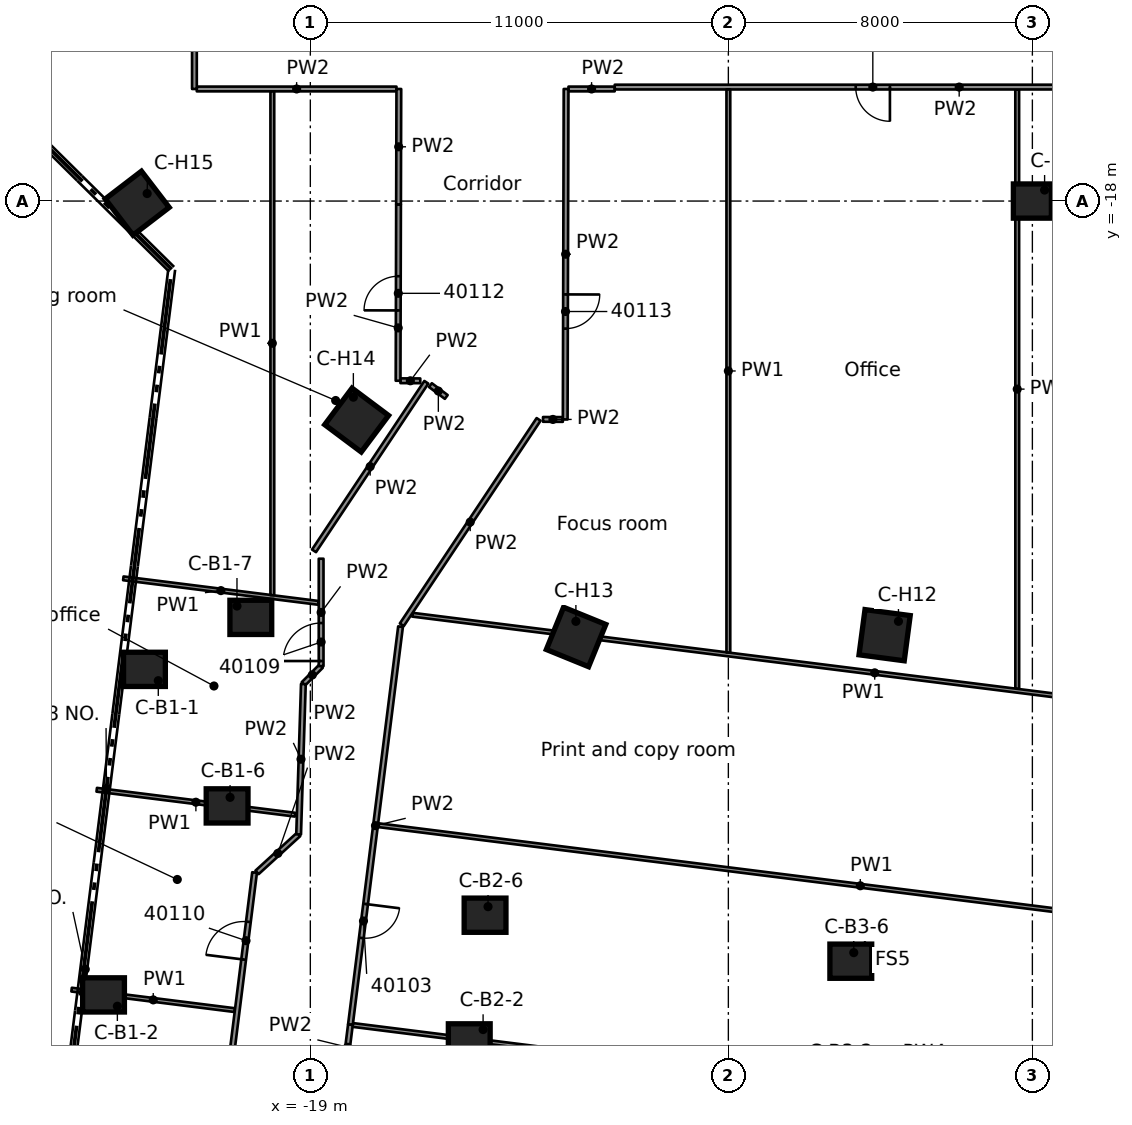
"""IFC4 building model, lengths in metres.
Left out: names, types, materials, properties, quantities, classifications, styles, units other than length and angle.
Written with IfcOpenShell. Run it as: python <this file> out.ifc"""

import sys

from ifc_helpers import new_model, si_unit, direction, frame, frame_2d, origin, origin_2d, place, context, subcontext, project, spatial, rectangle, extrude, element, fill, save


model = new_model("IFC4")
c1 = context("Model", 3, precision=1e-05, world=origin(), true_north=direction((0.0, 1.0)))
c2 = subcontext(c1, "Body", "Model", "MODEL_VIEW")
j1 = project(units=[si_unit("LENGTHUNIT", "METRE"), si_unit("PLANEANGLEUNIT", "RADIAN")], contexts=[c1])
p1 = place(None, origin())
s1 = spatial("IfcSite", under=j1, at=p1, CompositionType="ELEMENT")
p2 = place(p1, origin())
s2 = spatial("IfcBuilding", under=s1, at=p2, CompositionType="ELEMENT")
p3 = place(p2, frame((0.0, 0.0, 199.1)))
s3 = spatial("IfcBuildingStorey", under=s2, at=p3, CompositionType="ELEMENT", Elevation=199.1)
for number, where, z_axis, x_axis in (
    (1, (-23.365, -30.322, 0.0), (0.0, 0.0, 1.0), (1.0, 0.0, 0.0)),
    (2, (-24.442, -38.888, 0.0), (0.0, 0.0, 1.0), (1.0, 0.0, 0.0)),
    (3, (-21.19, -33.915, 0.0), (0.0, 0.0, 1.0), (1.0, 0.0, 0.0)),
    (4, (-20.566, -28.954, 0.0), (0.0, 0.0, 1.0), (1.0, 0.0, 0.0)),
    (5, (-14.818, -40.098, 0.0), (0.0, 0.0, 1.0), (1.0, 0.0, 0.0)),
    (6, (-14.402, -36.791, 0.0), (0.0, 0.0, 1.0), (1.0, 0.0, 0.0)),
    (7, (-4.778, -38.001, 0.0), (0.0, 0.0, 1.0), (1.0, 0.0, 0.0)),
):
    element("IfcColumn", number, at=place(p3, frame(where, z_axis=z_axis, x_axis=x_axis)), inside=s3, PredefinedType="COLUMN", context=c2, shape_type="SweptSolid", body=[
        extrude(rectangle(XDim=1.1, YDim=0.9, at=origin_2d()), origin(), (0.0, 0.0, 1.0), 3.5),
    ])
for number, where, z_axis, x_axis in (
    (8, (-3.888, -29.423, 0.0), (0.0, 0.0, 1.0), (-0.131, -0.991, 0.0)),
    (9, (-12.007, -29.47, 0.0), (0.0, 0.0, 1.0), (-0.377, -0.926, 0.0)),
    (10, (-17.781, -23.763, 0.0), (0.0, 0.0, 1.0), (-0.599, -0.801, 0.0)),
    (11, (-23.555, -18.056, 0.0), (0.0, 0.0, 1.0), (-0.794, -0.608, 0.0)),
):
    element("IfcColumn", number, at=place(p3, frame(where, z_axis=z_axis, x_axis=x_axis)), inside=s3, PredefinedType="COLUMN", context=c2, shape_type="SweptSolid", body=[
        extrude(rectangle(XDim=1.2, YDim=1.2, at=origin_2d()), origin(), (0.0, 0.0, 1.0), 3.5),
    ])
p4 = place(p3, frame((0.0, -18.0, 0.0), z_axis=(0.0, 0.0, 1.0), x_axis=(1.0, 0.0, 0.0)))
e12 = element("IfcColumn", 12, at=p4, inside=s3, PredefinedType="COLUMN", context=c2, shape_type="SweptSolid", body=[
    extrude(rectangle(XDim=1.0, YDim=0.9, at=origin_2d()), origin(), (0.0, 0.0, 1.0), 3.5),
])
p5 = place(p3, frame((-0.399, -15.062, 0.0), z_axis=(0.0, 0.0, 1.0), x_axis=(6.1913754e-05, -0.999999998083, 0.0)))
e13 = element("IfcWall", 13, at=p5, inside=s3, PredefinedType="PARTITIONING", context=c2, shape_type="SweptSolid", body=[
    extrude(rectangle(XDim=15.773, YDim=0.1, at=frame_2d((7.886, 0.0))), origin(), (0.0, 0.0, 1.0), 3.03),
])
p6 = place(p3, frame((-15.84, -22.843, 0.0), z_axis=(0.0, 0.0, 1.0), x_axis=(0.80067453545, -0.599099564582, 0.0)))
e14 = element("IfcWall", 14, at=p6, inside=s3, PredefinedType="PARTITIONING", context=c2, shape_type="SweptSolid", body=[
    extrude(rectangle(XDim=0.521, YDim=0.125, at=frame_2d((0.26, 0.0))), origin(), (0.0, 0.0, 1.0), 3.03),
])
p7 = place(p3, frame((-25.282, -38.749, 0.0), z_axis=(0.0, 0.0, 1.0), x_axis=(0.992194392082, -0.124700795187, 0.0)))
e15 = element("IfcWall", 15, at=p7, inside=s3, PredefinedType="PARTITIONING", context=c2, shape_type="SweptSolid", body=[
    extrude(rectangle(XDim=4.331, YDim=0.1, at=frame_2d((2.165, 0.0))), origin(), (0.0, 0.0, 1.0), 3.03),
])
p8 = place(p3, frame((-17.883, -39.679, 0.0), z_axis=(0.0, 0.0, 1.0), x_axis=(0.992186741223, -0.124761654932, 0.0)))
e16 = element("IfcWall", 16, at=p8, inside=s3, PredefinedType="PARTITIONING", context=c2, shape_type="SweptSolid", body=[
    extrude(rectangle(XDim=25.586, YDim=0.1, at=frame_2d((12.793, 0.0))), origin(), (0.0, 0.0, 1.0), 2.395),
])
p9 = place(p3, frame((-24.621, -33.49, 0.0), z_axis=(0.0, 0.0, 1.0), x_axis=(0.992192670487, -0.124714492473, 0.0)))
e17 = element("IfcWall", 17, at=p9, inside=s3, PredefinedType="PARTITIONING", context=c2, shape_type="SweptSolid", body=[
    extrude(rectangle(XDim=5.26, YDim=0.1, at=frame_2d((2.63, 0.0))), origin(), (0.0, 0.0, 1.0), 3.03),
])
p10 = place(p3, frame((-17.221, -34.421, 0.0), z_axis=(0.0, 0.0, 1.0), x_axis=(0.992190871449, -0.124728804262, 0.0)))
e18 = element("IfcWall", 18, at=p10, inside=s3, PredefinedType="PARTITIONING", context=c2, shape_type="SweptSolid", body=[
    extrude(rectangle(XDim=25.585, YDim=0.1, at=frame_2d((12.792, 0.0))), origin(), (0.0, 0.0, 1.0), 3.03),
])
p11 = place(p3, frame((-23.921, -27.927, 0.0), z_axis=(0.0, 0.0, 1.0), x_axis=(0.992179593467, -0.124818485443, 0.0)))
e19 = element("IfcWall", 19, at=p11, inside=s3, PredefinedType="PARTITIONING", context=c2, shape_type="SweptSolid", body=[
    extrude(rectangle(XDim=5.176, YDim=0.1, at=frame_2d((2.588, 0.0))), origin(), (0.0, 0.0, 1.0), 3.03),
])
p12 = place(p3, frame((-16.315, -28.884, 0.0), z_axis=(0.0, 0.0, 1.0), x_axis=(0.992189406065, -0.124740460527, 0.0)))
e20 = element("IfcWall", 20, at=p12, inside=s3, PredefinedType="PARTITIONING", context=c2, shape_type="SweptSolid", body=[
    extrude(rectangle(XDim=24.524, YDim=0.1, at=frame_2d((12.262, 0.0))), origin(), (0.0, 0.0, 1.0), 3.03),
])
for number, where, z_axis, x_axis in (
    (21, (-12.877, -23.745, 0.0), (0.0, 0.0, 1.0), (1.0, -0.004, 0.0)),
    (22, (-16.629, -22.728, 0.0), (0.0, 0.0, 1.0), (1.0, -0.004, 0.0)),
):
    element("IfcWall", number, at=place(p3, frame(where, z_axis=z_axis, x_axis=x_axis)), inside=s3, PredefinedType="PARTITIONING", context=c2, shape_type="SweptSolid", body=[
        extrude(rectangle(XDim=0.522, YDim=0.125, at=frame_2d((0.261, 0.0))), origin(), (0.0, 0.0, 1.0), 3.03),
    ])
p13 = place(p3, frame((-20.402, -35.664, 0.0), z_axis=(0.0, 0.0, 1.0), x_axis=(0.738431976745, 0.674327973408, 0.0)))
e23 = element("IfcWall", 23, at=p13, inside=s3, PredefinedType="PARTITIONING", context=c2, shape_type="SweptSolid", body=[
    extrude(rectangle(XDim=1.481, YDim=0.125, at=frame_2d((0.741, 0.0))), origin(), (0.0, 0.0, 1.0), 3.03),
])
p14 = place(p3, frame((-19.182, -30.703, 0.0), z_axis=(0.0, 0.0, 1.0), x_axis=(0.707106781187, 0.707106781187, 0.0)))
e24 = element("IfcWall", 24, at=p14, inside=s3, PredefinedType="PARTITIONING", context=c2, shape_type="SweptSolid", body=[
    extrude(rectangle(XDim=0.659, YDim=0.125, at=frame_2d((0.329, 0.0))), origin(), (0.0, 0.0, 1.0), 3.03),
])
p15 = place(p3, frame((-21.988, -15.051, 0.0), z_axis=(0.0, 0.0, 1.0), x_axis=(1.0, 0.0, 0.0)))
e25 = element("IfcWall", 25, at=p15, inside=s3, PredefinedType="PARTITIONING", context=c2, shape_type="SweptSolid", body=[
    extrude(rectangle(XDim=5.255, YDim=0.125, at=frame_2d((2.627, 0.0))), origin(), (0.0, 0.0, 1.0), 3.03),
])
p16 = place(p3, frame((-12.207, -15.051, 0.0), z_axis=(0.0, 0.0, 1.0), x_axis=(1.0, 0.0, 0.0)))
e26 = element("IfcWall", 26, at=p16, inside=s3, PredefinedType="PARTITIONING", context=c2, shape_type="SweptSolid", body=[
    extrude(rectangle(XDim=1.216, YDim=0.125, at=frame_2d((0.608, 0.0))), origin(), (0.0, 0.0, 1.0), 3.03),
])
p17 = place(p3, frame((7.138, -15.001, 0.0), z_axis=(0.0, 0.0, 1.0), x_axis=(-1.0, 0.0, 0.0)))
e27 = element("IfcWall", 27, at=p17, inside=s3, PredefinedType="PARTITIONING", context=c2, shape_type="SweptSolid", body=[
    extrude(rectangle(XDim=18.128, YDim=0.125, at=frame_2d((9.064, 0.0))), origin(), (0.0, 0.0, 1.0), 3.03),
])
p18 = place(p17, frame((10.886, 0.0, 0.0)))
e28 = element("IfcOpeningElement", 28, at=p18, cuts=e27, PredefinedType="OPENING", context=c2, shape_type="SweptSolid", body=[
    extrude(rectangle(XDim=0.9, YDim=2.1, at=frame_2d((0.45, 1.05))), frame((0.0, 0.073, 0.0), z_axis=(0.0, -1.0, 0.0), x_axis=(1.0, 0.0, 0.0)), (0.0, 0.0, 1.0), 0.145),
])
p19 = place(p3, frame((-12.993, -23.745, 0.0), z_axis=(0.0, 0.0, 1.0), x_axis=(-0.554439865958, -0.832223789035, 0.0)))
e29 = element("IfcWall", 29, at=p19, inside=s3, PredefinedType="PARTITIONING", context=c2, shape_type="SweptSolid", body=[
    extrude(rectangle(XDim=6.493, YDim=0.125, at=frame_2d((3.247, 0.0))), origin(), (0.0, 0.0, 1.0), 3.03),
])
p20 = place(p3, frame((-15.948, -22.768, 0.0), z_axis=(0.0, 0.0, 1.0), x_axis=(-0.554404200785, -0.832247548601, 0.0)))
e30 = element("IfcWall", 30, at=p20, inside=s3, PredefinedType="PARTITIONING", context=c2, shape_type="SweptSolid", body=[
    extrude(rectangle(XDim=5.33, YDim=0.125, at=frame_2d((2.665, 0.0))), origin(), (0.0, 0.0, 1.0), 3.03),
])
p21 = place(p3, frame((-19.183, -30.708, 0.0), z_axis=(0.0, 0.0, 1.0), x_axis=(-0.0315735891, -0.99950142995, 0.0)))
e31 = element("IfcWall", 31, at=p21, inside=s3, PredefinedType="PARTITIONING", context=c2, shape_type="SweptSolid", body=[
    extrude(rectangle(XDim=3.959, YDim=0.125, at=frame_2d((1.979, 0.0))), origin(), (0.0, 0.0, 1.0), 3.03),
])
p22 = place(p3, frame((-16.626, -29.198, 0.0), z_axis=(0.0, 0.0, 1.0), x_axis=(-0.1249655299, -0.992161083865, 0.0)))
e32 = element("IfcWall", 32, at=p22, inside=s3, PredefinedType="PARTITIONING", context=c2, shape_type="SweptSolid", body=[
    extrude(rectangle(XDim=10.556, YDim=0.125, at=frame_2d((5.278, 0.0))), origin(), (0.0, 0.0, 1.0), 3.03),
])
p23 = place(p22, frame((7.356, 0.0, 0.0)))
e33 = element("IfcOpeningElement", 33, at=p23, cuts=e32, PredefinedType="OPENING", context=c2, shape_type="SweptSolid", body=[
    extrude(rectangle(XDim=0.9, YDim=2.1, at=frame_2d((0.45, 1.05))), frame((0.0, 0.073, 0.0), z_axis=(0.0, -1.0, 0.0), x_axis=(1.0, 0.0, 0.0)), (0.0, 0.0, 1.0), 0.145),
])
p24 = place(p3, frame((-18.094, -40.858, 0.0), z_axis=(0.0, 0.0, 1.0), x_axis=(0.124486830253, 0.99222126015, 0.0)))
e34 = element("IfcWall", 34, at=p24, inside=s3, PredefinedType="PARTITIONING", context=c2, shape_type="SweptSolid", body=[
    extrude(rectangle(XDim=1.196, YDim=0.125, at=frame_2d((0.598, 0.0))), origin(), (0.0, 0.0, 1.0), 3.03),
])
p25 = place(p3, frame((-22.52, -52.008, 0.0), z_axis=(0.0, 0.0, 1.0), x_axis=(0.124660538506, 0.992199450786, 0.0)))
e35 = element("IfcWall", 35, at=p25, inside=s3, PredefinedType="PARTITIONING", context=c2, shape_type="SweptSolid", body=[
    extrude(rectangle(XDim=16.469, YDim=0.125, at=frame_2d((8.234, 0.0))), origin(), (0.0, 0.0, 1.0), 2.395),
])
p26 = place(p25, frame((14.161, 0.0, 0.0)))
e36 = element("IfcOpeningElement", 36, at=p26, cuts=e35, PredefinedType="OPENING", context=c2, shape_type="SweptSolid", body=[
    extrude(rectangle(XDim=1.0, YDim=2.1, at=frame_2d((0.5, 1.05))), frame((0.0, 0.073, 0.0), z_axis=(0.0, -1.0, 0.0), x_axis=(1.0, 0.0, 0.0)), (0.0, 0.0, 1.0), 0.145),
])
p27 = place(p3, frame((-12.27, -15.051, 0.0), z_axis=(0.0, 0.0, 1.0), x_axis=(-0.002639031771, -0.99999651775, 0.0)))
e37 = element("IfcWall", 37, at=p27, inside=s3, PredefinedType="PARTITIONING", context=c2, shape_type="SweptSolid", body=[
    extrude(rectangle(XDim=8.696, YDim=0.125, at=frame_2d((4.348, 0.0))), origin(), (0.0, 0.0, 1.0), 3.03),
])
p28 = place(p27, frame((5.406, 0.0, 0.0)))
e38 = element("IfcOpeningElement", 38, at=p28, cuts=e37, PredefinedType="OPENING", context=c2, shape_type="SweptSolid", body=[
    extrude(rectangle(XDim=0.9, YDim=2.1, at=frame_2d((0.45, 1.05))), frame((0.0, 0.073, 0.0), z_axis=(0.0, -1.0, 0.0), x_axis=(1.0, 0.0, 0.0)), (0.0, 0.0, 1.0), 0.145),
])
p29 = place(p3, frame((-16.679, -18.094, 0.0), z_axis=(0.0, 0.0, 1.0), x_axis=(0.002647615881, 0.999996495059, 0.0)))
e39 = element("IfcWall", 39, at=p29, inside=s3, PredefinedType="PARTITIONING", context=c2, shape_type="SweptSolid", body=[
    extrude(rectangle(XDim=3.043, YDim=0.125, at=frame_2d((1.521, 0.0))), origin(), (0.0, 0.0, 1.0), 3.03),
])
p30 = place(p3, frame((-16.691, -22.728, 0.0), z_axis=(0.0, 0.0, 1.0), x_axis=(0.002581520295, 0.999996667871, 0.0)))
e40 = element("IfcWall", 40, at=p30, inside=s3, PredefinedType="PARTITIONING", context=c2, shape_type="SweptSolid", body=[
    extrude(rectangle(XDim=4.634, YDim=0.125, at=frame_2d((2.317, 0.0))), origin(), (0.0, 0.0, 1.0), 3.03),
])
p31 = place(p30, frame((1.85, 0.0, 0.0)))
e41 = element("IfcOpeningElement", 41, at=p31, cuts=e40, PredefinedType="OPENING", context=c2, shape_type="SweptSolid", body=[
    extrude(rectangle(XDim=0.9, YDim=2.1, at=frame_2d((0.45, 1.05))), frame((0.0, 0.073, 0.0), z_axis=(0.0, -1.0, 0.0), x_axis=(1.0, 0.0, 0.0)), (0.0, 0.0, 1.0), 0.145),
])
p32 = place(p3, frame((-8.0, -29.879, 0.0), z_axis=(0.0, 0.0, 1.0), x_axis=(0.0, 1.0, 0.0)))
e42 = element("IfcWall", 42, at=p32, inside=s3, PredefinedType="PARTITIONING", context=c2, shape_type="SweptSolid", body=[
    extrude(rectangle(XDim=14.816, YDim=0.1, at=frame_2d((7.408, 0.0))), origin(), (0.0, 0.0, 1.0), 3.03),
])
p33 = place(p3, frame((-18.716, -30.237, 0.0), z_axis=(0.0, 0.0, 1.0), x_axis=(0.0, 1.0, 0.0)))
e43 = element("IfcWall", 43, at=p33, inside=s3, PredefinedType="PARTITIONING", context=c2, shape_type="SweptSolid", body=[
    extrude(rectangle(XDim=2.826, YDim=0.125, at=frame_2d((1.413, 0.0))), origin(), (0.0, 0.0, 1.0), 3.03),
])
p34 = place(p33, frame((0.134, 0.0, 0.0)))
e44 = element("IfcOpeningElement", 44, at=p34, cuts=e43, PredefinedType="OPENING", context=c2, shape_type="SweptSolid", body=[
    extrude(rectangle(XDim=1.0, YDim=2.1, at=frame_2d((0.5, 1.05))), frame((0.0, 0.073, 0.0), z_axis=(0.0, -1.0, 0.0), x_axis=(1.0, 0.0, 0.0)), (0.0, 0.0, 1.0), 0.145),
])
p35 = place(p3, frame((-20.0, -28.37, 0.0), z_axis=(0.0, 0.0, 1.0), x_axis=(0.0, 1.0, 0.0)))
e45 = element("IfcWall", 45, at=p35, inside=s3, PredefinedType="PARTITIONING", context=c2, shape_type="SweptSolid", body=[
    extrude(rectangle(XDim=13.256, YDim=0.1, at=frame_2d((6.628, 0.0))), origin(), (0.0, 0.0, 1.0), 3.03),
])
p36 = place(p3, frame((-22.05, -15.051, 0.0), z_axis=(0.0, 0.0, 1.0), x_axis=(0.0, 1.0, 0.0)))
e46 = element("IfcWall", 46, at=p36, inside=s3, PredefinedType="PARTITIONING", context=c2, shape_type="SweptSolid", body=[
    extrude(rectangle(XDim=30.102, YDim=0.125, at=frame_2d((15.051, 0.0))), origin(), (0.0, 0.0, 1.0), 3.03),
])
p37 = place(p36, frame((7.1, 0.0, 0.0)))
e47 = element("IfcOpeningElement", 47, at=p37, cuts=e46, PredefinedType="OPENING", context=c2, shape_type="SweptSolid", body=[
    extrude(rectangle(XDim=0.9, YDim=2.1, at=frame_2d((0.45, 1.05))), frame((0.0, 0.073, 0.0), z_axis=(0.0, -1.0, 0.0), x_axis=(1.0, 0.0, 0.0)), (0.0, 0.0, 1.0), 0.145),
])
p38 = place(p36, frame((21.651, 0.0, 0.0)))
e48 = element("IfcOpeningElement", 48, at=p38, cuts=e46, PredefinedType="OPENING", context=c2, shape_type="SweptSolid", body=[
    extrude(rectangle(XDim=1.8, YDim=2.1, at=frame_2d((0.9, 1.05))), frame((0.0, 0.073, 0.0), z_axis=(0.0, -1.0, 0.0), x_axis=(1.0, 0.0, 0.0)), (0.0, 0.0, 1.0), 0.145),
])
p39 = place(p23, origin())
e49 = element("IfcDoor", 49, at=p39, inside=s3, OperationType="SINGLE_SWING_RIGHT", PredefinedType="DOOR", context=c2, shape_type="SweptSolid", body=[
    extrude(rectangle(XDim=0.9, YDim=2.1, at=frame_2d((0.45, 1.05))), frame((0.0, 0.025, 0.0), z_axis=(0.0, -1.0, 0.0), x_axis=(1.0, 0.0, 0.0)), (0.0, 0.0, 1.0), 0.05),
])
fill(e33, e49)
p40 = place(p34, origin())
e50 = element("IfcDoor", 50, at=p40, inside=s3, OperationType="SINGLE_SWING_LEFT", PredefinedType="DOOR", context=c2, shape_type="SweptSolid", body=[
    extrude(rectangle(XDim=1.0, YDim=2.1, at=frame_2d((0.5, 1.05))), frame((0.0, 0.025, 0.0), z_axis=(0.0, -1.0, 0.0), x_axis=(1.0, 0.0, 0.0)), (0.0, 0.0, 1.0), 0.05),
])
fill(e44, e50)
p41 = place(p26, origin())
e51 = element("IfcDoor", 51, at=p41, inside=s3, OperationType="SINGLE_SWING_RIGHT", PredefinedType="DOOR", context=c2, shape_type="SweptSolid", body=[
    extrude(rectangle(XDim=1.0, YDim=2.1, at=frame_2d((0.5, 1.05))), frame((0.0, 0.025, 0.0), z_axis=(0.0, -1.0, 0.0), x_axis=(1.0, 0.0, 0.0)), (0.0, 0.0, 1.0), 0.05),
])
fill(e36, e51)
p42 = place(p31, origin())
e52 = element("IfcDoor", 52, at=p42, inside=s3, OperationType="SINGLE_SWING_LEFT", PredefinedType="DOOR", context=c2, shape_type="SweptSolid", body=[
    extrude(rectangle(XDim=0.9, YDim=2.1, at=frame_2d((0.45, 1.05))), frame((0.0, 0.025, 0.0), z_axis=(0.0, -1.0, 0.0), x_axis=(1.0, 0.0, 0.0)), (0.0, 0.0, 1.0), 0.05),
])
fill(e41, e52)
p43 = place(p28, origin())
e53 = element("IfcDoor", 53, at=p43, inside=s3, OperationType="SINGLE_SWING_RIGHT", PredefinedType="DOOR", context=c2, shape_type="SweptSolid", body=[
    extrude(rectangle(XDim=0.9, YDim=2.1, at=frame_2d((0.45, 1.05))), frame((0.0, 0.025, 0.0), z_axis=(0.0, -1.0, 0.0), x_axis=(1.0, 0.0, 0.0)), (0.0, 0.0, 1.0), 0.05),
])
fill(e38, e53)
p44 = place(p18, origin())
e54 = element("IfcDoor", 54, at=p44, inside=s3, OperationType="SINGLE_SWING_RIGHT", PredefinedType="DOOR", context=c2, shape_type="SweptSolid", body=[
    extrude(rectangle(XDim=0.9, YDim=2.1, at=frame_2d((0.45, 1.05))), frame((0.0, 0.025, 0.0), z_axis=(0.0, -1.0, 0.0), x_axis=(1.0, 0.0, 0.0)), (0.0, 0.0, 1.0), 0.05),
])
fill(e28, e54)
save(model, sys.argv[1])
